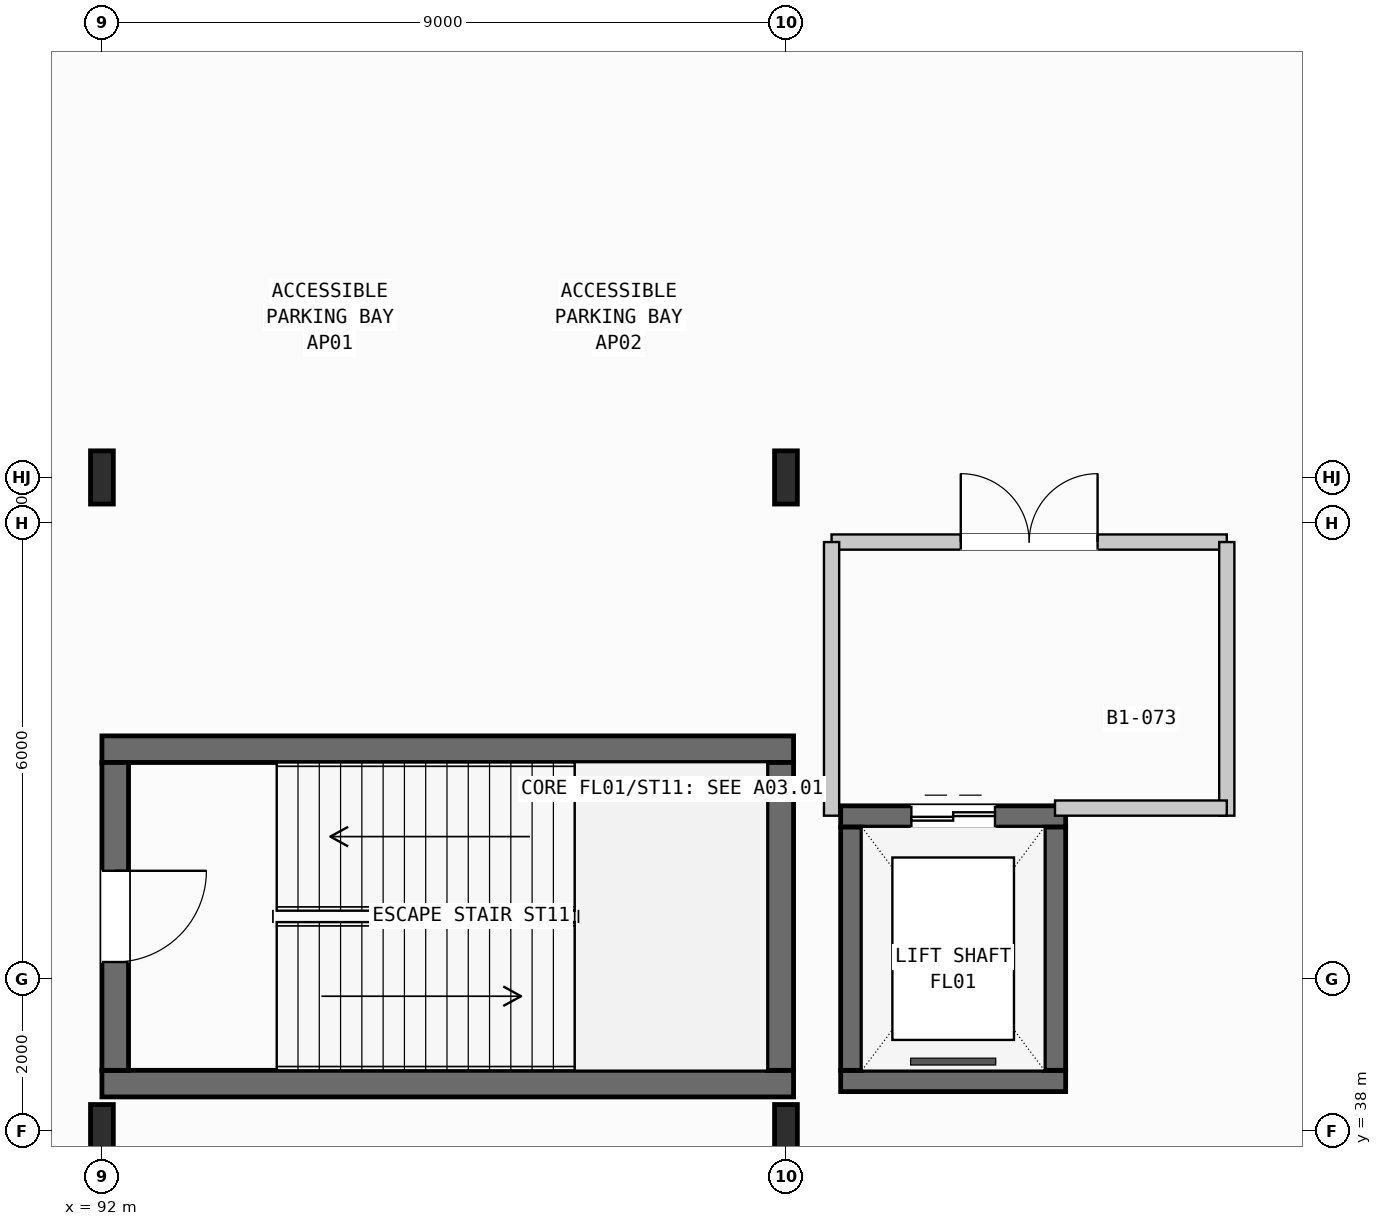
"""IFC4 building model, lengths in metres.
Left out: names, types, materials, properties, quantities, classifications, styles, units other than length and angle.
Written with IfcOpenShell. Run it as: python <this file> out.ifc"""

import sys

from ifc_helpers import new_model, si_unit, direction, frame, frame_2d, origin, origin_2d, place, context, subcontext, project, spatial, rectangle, i_section, extrude, element, fill, save


model = new_model("IFC4")
c1 = context("Model", 3, precision=1e-05, world=origin(), true_north=direction((0.0, 1.0)))
c2 = subcontext(c1, "Body", "Model", "MODEL_VIEW")
j1 = project(units=[si_unit("LENGTHUNIT", "METRE"), si_unit("PLANEANGLEUNIT", "RADIAN")], contexts=[c1])
p1 = place(None, origin())
s1 = spatial("IfcSite", under=j1, at=p1, CompositionType="ELEMENT")
p2 = place(p1, origin())
s2 = spatial("IfcBuilding", under=s1, at=p2, CompositionType="ELEMENT")
p3 = place(p2, frame((0.0, 0.0, -5.4)))
s3 = spatial("IfcBuildingStorey", under=s2, at=p3, CompositionType="ELEMENT", Elevation=-5.4)
for number, where, z_axis, x_axis in (
    (1, (92.0, 38.0, 0.0), (0.0, 0.0, 1.0), (1.0, 0.0, 0.0)),
    (2, (92.0, 46.6, 0.0), (0.0, 0.0, 1.0), (1.0, 0.0, 0.0)),
    (3, (101.0, 38.0, 0.0), (0.0, 0.0, 1.0), (1.0, 0.0, 0.0)),
    (4, (101.0, 46.6, 0.0), (0.0, 0.0, 1.0), (1.0, 0.0, 0.0)),
):
    element("IfcColumn", number, at=place(p3, frame(where, z_axis=z_axis, x_axis=x_axis)), inside=s3, PredefinedType="COLUMN", context=c2, shape_type="SweptSolid", body=[
        extrude(i_section(OverallWidth=0.3, OverallDepth=0.7, WebThickness=0.017, FlangeThickness=0.032, FilletRadius=0.027, at=origin_2d()), origin(), (0.0, 0.0, 1.0), 5.4),
    ])
for number, where, z_axis, x_axis in (
    (5, (92.0, 38.625, 0.0), (0.0, 0.0, 1.0), (1.0, 0.0, 0.0)),
    (6, (92.0, 43.025, 0.0), (0.0, 0.0, 1.0), (1.0, 0.0, 0.0)),
):
    element("IfcWall", number, at=place(p3, frame(where, z_axis=z_axis, x_axis=x_axis)), inside=s3, PredefinedType="SHEAR", context=c2, shape_type="SweptSolid", body=[
        extrude(rectangle(XDim=9.1, YDim=0.35, at=frame_2d((4.55, 0.0))), origin(), (0.0, 0.0, 1.0), 5.4),
    ])
p4 = place(p3, frame((92.175, 38.8, 0.0), z_axis=(0.0, 0.0, 1.0), x_axis=(0.0, 1.0, 0.0)))
e7 = element("IfcWall", 7, at=p4, inside=s3, PredefinedType="SHEAR", context=c2, shape_type="SweptSolid", body=[
    extrude(rectangle(XDim=4.05, YDim=0.35, at=frame_2d((2.025, 0.0))), origin(), (0.0, 0.0, 1.0), 5.4),
])
p5 = place(p4, frame((1.425, 0.0, 0.0)))
e8 = element("IfcOpeningElement", 8, at=p5, cuts=e7, PredefinedType="OPENING", context=c2, shape_type="SweptSolid", body=[
    extrude(rectangle(XDim=1.2, YDim=2.2, at=frame_2d((0.6, 1.1))), frame((0.0, 0.185, 0.0), z_axis=(0.0, -1.0, 0.0), x_axis=(1.0, 0.0, 0.0)), (0.0, 0.0, 1.0), 0.37),
])
p6 = place(p3, frame((100.925, 38.8, 0.0), z_axis=(0.0, 0.0, 1.0), x_axis=(0.0, 1.0, 0.0)))
e9 = element("IfcWall", 9, at=p6, inside=s3, PredefinedType="SHEAR", context=c2, shape_type="SweptSolid", body=[
    extrude(rectangle(XDim=4.05, YDim=0.35, at=frame_2d((2.025, 0.0))), origin(), (0.0, 0.0, 1.0), 5.4),
])
p7 = place(p3, frame((101.72, 38.66, 0.0), z_axis=(0.0, 0.0, 1.0), x_axis=(1.0, 0.0, 0.0)))
e10 = element("IfcWall", 10, at=p7, inside=s3, PredefinedType="SHEAR", context=c2, shape_type="SweptSolid", body=[
    extrude(rectangle(XDim=2.96, YDim=0.28, at=frame_2d((1.48, 0.0))), origin(), (0.0, 0.0, 1.0), 5.4),
])
p8 = place(p3, frame((101.72, 42.14, 0.0), z_axis=(0.0, 0.0, 1.0), x_axis=(1.0, 0.0, 0.0)))
e11 = element("IfcWall", 11, at=p8, inside=s3, PredefinedType="SHEAR", context=c2, shape_type="SweptSolid", body=[
    extrude(rectangle(XDim=2.96, YDim=0.28, at=frame_2d((1.48, 0.0))), origin(), (0.0, 0.0, 1.0), 5.4),
])
p9 = place(p8, frame((0.93, 0.0, 0.0)))
e12 = element("IfcOpeningElement", 12, at=p9, cuts=e11, PredefinedType="OPENING", context=c2, shape_type="SweptSolid", body=[
    extrude(rectangle(XDim=1.1, YDim=2.15, at=frame_2d((0.55, 1.075))), frame((0.0, 0.15, 0.0), z_axis=(0.0, -1.0, 0.0), x_axis=(1.0, 0.0, 0.0)), (0.0, 0.0, 1.0), 0.3),
])
for number, where, z_axis, x_axis in (
    (13, (101.86, 38.8, 0.0), (0.0, 0.0, 1.0), (0.0, 1.0, 0.0)),
    (14, (104.54, 38.8, 0.0), (0.0, 0.0, 1.0), (0.0, 1.0, 0.0)),
):
    element("IfcWall", number, at=place(p3, frame(where, z_axis=z_axis, x_axis=x_axis)), inside=s3, PredefinedType="SHEAR", context=c2, shape_type="SweptSolid", body=[
        extrude(rectangle(XDim=3.2, YDim=0.28, at=frame_2d((1.6, 0.0))), origin(), (0.0, 0.0, 1.0), 5.4),
    ])
p10 = place(p3, frame((101.6, 45.75, 0.0), z_axis=(0.0, 0.0, 1.0), x_axis=(1.0, 0.0, 0.0)))
e15 = element("IfcWall", 15, at=p10, inside=s3, PredefinedType="PARTITIONING", context=c2, shape_type="SweptSolid", body=[
    extrude(rectangle(XDim=5.2, YDim=0.2, at=frame_2d((2.6, 0.0))), origin(), (0.0, 0.0, 1.0), 4.0),
])
p11 = place(p10, frame((1.7, 0.0, 0.0)))
e16 = element("IfcOpeningElement", 16, at=p11, cuts=e15, PredefinedType="OPENING", context=c2, shape_type="SweptSolid", body=[
    extrude(rectangle(XDim=1.8, YDim=2.2, at=frame_2d((0.9, 1.1))), frame((0.0, 0.11, 0.0), z_axis=(0.0, -1.0, 0.0), x_axis=(1.0, 0.0, 0.0)), (0.0, 0.0, 1.0), 0.22),
])
for number, where, z_axis, x_axis in (
    (17, (101.6, 42.15, 0.0), (0.0, 0.0, 1.0), (0.0, 1.0, 0.0)),
    (18, (106.8, 42.15, 0.0), (0.0, 0.0, 1.0), (0.0, 1.0, 0.0)),
):
    element("IfcWall", number, at=place(p3, frame(where, z_axis=z_axis, x_axis=x_axis)), inside=s3, PredefinedType="PARTITIONING", context=c2, shape_type="SweptSolid", body=[
        extrude(rectangle(XDim=3.6, YDim=0.2, at=frame_2d((1.8, 0.0))), origin(), (0.0, 0.0, 1.0), 4.0),
    ])
p12 = place(p3, frame((104.54, 42.25, 0.0), z_axis=(0.0, 0.0, 1.0), x_axis=(1.0, 0.0, 0.0)))
e19 = element("IfcWall", 19, at=p12, inside=s3, PredefinedType="PARTITIONING", context=c2, shape_type="SweptSolid", body=[
    extrude(rectangle(XDim=2.26, YDim=0.2, at=frame_2d((1.13, 0.0))), origin(), (0.0, 0.0, 1.0), 4.0),
])
p13 = place(p5, frame((1.2, 0.0, 0.0), z_axis=(0.0, 0.0, 1.0), x_axis=(-1.0, 0.0, 0.0)))
e20 = element("IfcDoor", 20, at=p13, inside=s3, OperationType="SINGLE_SWING_LEFT", PredefinedType="DOOR", context=c2, shape_type="SweptSolid", body=[
    extrude(rectangle(XDim=1.2, YDim=2.2, at=frame_2d((0.6, 1.1))), frame((0.0, 0.025, 0.0), z_axis=(0.0, -1.0, 0.0), x_axis=(1.0, 0.0, 0.0)), (0.0, 0.0, 1.0), 0.05),
])
fill(e8, e20)
p14 = place(p9, origin())
e21 = element("IfcDoor", 21, at=p14, inside=s3, OperationType="DOUBLE_DOOR_SLIDING", PredefinedType="DOOR", context=c2, shape_type="SweptSolid", body=[
    extrude(rectangle(XDim=1.1, YDim=2.15, at=frame_2d((0.55, 1.075))), frame((0.0, 0.025, 0.0), z_axis=(0.0, -1.0, 0.0), x_axis=(1.0, 0.0, 0.0)), (0.0, 0.0, 1.0), 0.05),
])
fill(e12, e21)
p15 = place(p11, origin())
e22 = element("IfcDoor", 22, at=p15, inside=s3, OperationType="DOUBLE_DOOR_SINGLE_SWING", PredefinedType="DOOR", context=c2, shape_type="SweptSolid", body=[
    extrude(rectangle(XDim=1.8, YDim=2.2, at=frame_2d((0.9, 1.1))), frame((0.0, 0.025, 0.0), z_axis=(0.0, -1.0, 0.0), x_axis=(1.0, 0.0, 0.0)), (0.0, 0.0, 1.0), 0.05),
])
fill(e16, e22)
save(model, sys.argv[1])
